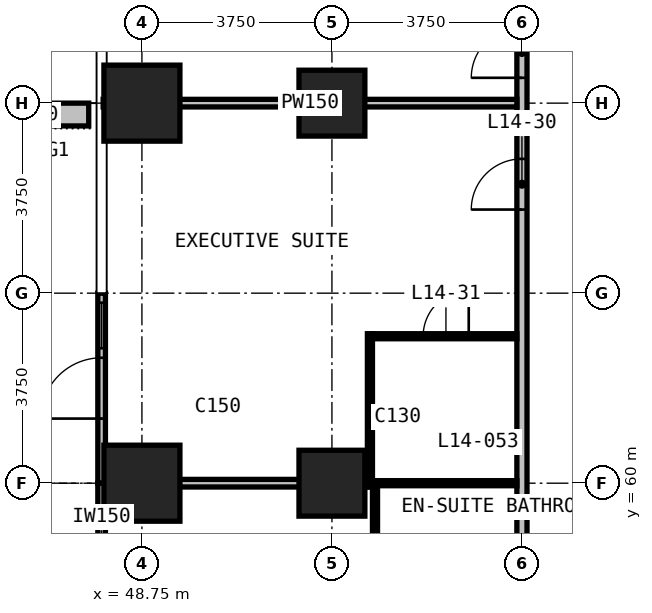
"""IFC4 building model, lengths in metres.
Left out: names, types, materials, properties, quantities, classifications, styles, units other than length and angle.
Written with IfcOpenShell. Run it as: python <this file> out.ifc"""

import sys

from ifc_helpers import new_model, si_unit, direction, frame, frame_2d, origin, origin_2d, place, context, subcontext, project, spatial, rectangle, extrude, element, fill, save


model = new_model("IFC4")
c1 = context("Model", 3, precision=1e-05, world=origin(), true_north=direction((0.0, 1.0)))
c2 = subcontext(c1, "Body", "Model", "MODEL_VIEW")
j1 = project(units=[si_unit("LENGTHUNIT", "METRE"), si_unit("PLANEANGLEUNIT", "RADIAN")], contexts=[c1])
p1 = place(None, origin())
s1 = spatial("IfcSite", under=j1, at=p1, CompositionType="ELEMENT")
p2 = place(p1, origin())
s2 = spatial("IfcBuilding", under=s1, at=p2, CompositionType="ELEMENT")
p3 = place(p2, frame((0.0, 0.0, 65.9)))
s3 = spatial("IfcBuildingStorey", under=s2, at=p3, CompositionType="ELEMENT", Elevation=65.9)
for number, where, z_axis, x_axis in (
    (1, (48.75, 60.0, 0.0), (0.0, 0.0, 1.0), (1.0, 0.0, 0.0)),
    (2, (48.75, 67.5, 0.0), (0.0, 0.0, 1.0), (1.0, 0.0, 0.0)),
):
    element("IfcColumn", number, at=place(p3, frame(where, z_axis=z_axis, x_axis=x_axis)), inside=s3, PredefinedType="COLUMN", context=c2, shape_type="SweptSolid", body=[
        extrude(rectangle(XDim=1.5, YDim=1.5, at=origin_2d()), origin(), (0.0, 0.0, 1.0), 3.3),
    ])
for number, where, z_axis, x_axis in (
    (3, (52.5, 60.0, 0.0), (0.0, 0.0, 1.0), (1.0, 0.0, 0.0)),
    (4, (52.5, 67.5, 0.0), (0.0, 0.0, 1.0), (1.0, 0.0, 0.0)),
):
    element("IfcColumn", number, at=place(p3, frame(where, z_axis=z_axis, x_axis=x_axis)), inside=s3, PredefinedType="COLUMN", context=c2, shape_type="SweptSolid", body=[
        extrude(rectangle(XDim=1.3, YDim=1.3, at=origin_2d()), origin(), (0.0, 0.0, 1.0), 3.3),
    ])
p4 = place(p3, frame((47.955, 56.25, 0.0), z_axis=(0.0, 0.0, 1.0), x_axis=(0.0, 1.0, 0.0)))
e5 = element("IfcWall", 5, at=p4, inside=s3, PredefinedType="SOLIDWALL", context=c2, shape_type="SweptSolid", body=[
    extrude(rectangle(XDim=3.75, YDim=0.15, at=frame_2d((1.875, 0.0))), origin(), (0.0, 0.0, 1.0), 3.0),
])
p5 = place(p4, frame((0.188, 0.0, 0.1)))
e6 = element("IfcOpeningElement", 6, at=p5, cuts=e5, PredefinedType="OPENING", context=c2, shape_type="SweptSolid", body=[
    extrude(rectangle(XDim=0.9, YDim=2.4, at=frame_2d((0.45, 1.2))), frame((0.0, 0.085, 0.0), z_axis=(0.0, -1.0, 0.0), x_axis=(1.0, 0.0, 0.0)), (0.0, 0.0, 1.0), 0.17),
])
p6 = place(p4, frame((1.275, 0.0, 0.0)))
e7 = element("IfcOpeningElement", 7, at=p6, cuts=e5, PredefinedType="OPENING", context=c2, shape_type="SweptSolid", body=[
    extrude(rectangle(XDim=1.2, YDim=2.4, at=frame_2d((0.6, 1.2))), frame((0.0, 0.085, 0.0), z_axis=(0.0, -1.0, 0.0), x_axis=(1.0, 0.0, 0.0)), (0.0, 0.0, 1.0), 0.17),
])
p7 = place(p3, frame((47.955, 60.0, 0.0), z_axis=(0.0, 0.0, 1.0), x_axis=(0.0, 1.0, 0.0)))
e8 = element("IfcWall", 8, at=p7, inside=s3, PredefinedType="SOLIDWALL", context=c2, shape_type="SweptSolid", body=[
    extrude(rectangle(XDim=3.75, YDim=0.15, at=frame_2d((1.875, 0.0))), origin(), (0.0, 0.0, 1.0), 3.0),
])
p8 = place(p7, frame((1.275, 0.0, 0.0)))
e9 = element("IfcOpeningElement", 9, at=p8, cuts=e8, PredefinedType="OPENING", context=c2, shape_type="SweptSolid", body=[
    extrude(rectangle(XDim=1.2, YDim=2.4, at=frame_2d((0.6, 1.2))), frame((0.0, 0.085, 0.0), z_axis=(0.0, -1.0, 0.0), x_axis=(1.0, 0.0, 0.0)), (0.0, 0.0, 1.0), 0.17),
])
p9 = place(p7, frame((2.663, 0.0, 0.1)))
e10 = element("IfcOpeningElement", 10, at=p9, cuts=e8, PredefinedType="OPENING", context=c2, shape_type="SweptSolid", body=[
    extrude(rectangle(XDim=0.9, YDim=2.4, at=frame_2d((0.45, 1.2))), frame((0.0, 0.085, 0.0), z_axis=(0.0, -1.0, 0.0), x_axis=(1.0, 0.0, 0.0)), (0.0, 0.0, 1.0), 0.17),
])
p10 = place(p3, frame((47.7, 67.275, 0.0), z_axis=(0.0, 0.0, 1.0), x_axis=(-1.0, 0.0, 0.0)))
e11 = element("IfcWall", 11, at=p10, inside=s3, PredefinedType="USERDEFINED", context=c2, shape_type="SweptSolid", body=[
    extrude(rectangle(XDim=2.35, YDim=0.45, at=frame_2d((1.175, 0.0))), origin(), (0.0, 0.0, 1.0), 1.1),
])
p11 = place(p3, frame((56.25, 52.4, 0.0), z_axis=(0.0, 0.0, 1.0), x_axis=(0.0, 1.0, 0.0)))
e12 = element("IfcWall", 12, at=p11, inside=s3, PredefinedType="PARTITIONING", context=c2, shape_type="SweptSolid", body=[
    extrude(rectangle(XDim=38.31, YDim=0.2, at=frame_2d((19.155, 0.0))), origin(), (0.0, 0.0, 1.0), 3.0),
])
p12 = place(p11, frame((2.35, 0.0, 0.0)))
e13 = element("IfcOpeningElement", 13, at=p12, cuts=e12, PredefinedType="OPENING", context=c2, shape_type="SweptSolid", body=[
    extrude(rectangle(XDim=1.0, YDim=2.2, at=frame_2d((0.5, 1.1))), frame((0.0, 0.11, 0.0), z_axis=(0.0, -1.0, 0.0), x_axis=(1.0, 0.0, 0.0)), (0.0, 0.0, 1.0), 0.22),
])
p13 = place(p11, frame((4.35, 0.0, 0.0)))
e14 = element("IfcOpeningElement", 14, at=p13, cuts=e12, PredefinedType="OPENING", context=c2, shape_type="SweptSolid", body=[
    extrude(rectangle(XDim=1.0, YDim=2.2, at=frame_2d((0.5, 1.1))), frame((0.0, 0.11, 0.0), z_axis=(0.0, -1.0, 0.0), x_axis=(1.0, 0.0, 0.0)), (0.0, 0.0, 1.0), 0.22),
])
p14 = place(p11, frame((13.0, 0.0, 0.0)))
e15 = element("IfcOpeningElement", 15, at=p14, cuts=e12, PredefinedType="OPENING", context=c2, shape_type="SweptSolid", body=[
    extrude(rectangle(XDim=1.0, YDim=2.2, at=frame_2d((0.5, 1.1))), frame((0.0, 0.11, 0.0), z_axis=(0.0, -1.0, 0.0), x_axis=(1.0, 0.0, 0.0)), (0.0, 0.0, 1.0), 0.22),
])
p15 = place(p11, frame((15.6, 0.0, 0.0)))
e16 = element("IfcOpeningElement", 16, at=p15, cuts=e12, PredefinedType="OPENING", context=c2, shape_type="SweptSolid", body=[
    extrude(rectangle(XDim=1.0, YDim=2.2, at=frame_2d((0.5, 1.1))), frame((0.0, 0.11, 0.0), z_axis=(0.0, -1.0, 0.0), x_axis=(1.0, 0.0, 0.0)), (0.0, 0.0, 1.0), 0.22),
])
p16 = place(p11, frame((21.1, 0.0, 0.0)))
e17 = element("IfcOpeningElement", 17, at=p16, cuts=e12, PredefinedType="OPENING", context=c2, shape_type="SweptSolid", body=[
    extrude(rectangle(XDim=1.0, YDim=2.2, at=frame_2d((0.5, 1.1))), frame((0.0, 0.11, 0.0), z_axis=(0.0, -1.0, 0.0), x_axis=(1.0, 0.0, 0.0)), (0.0, 0.0, 1.0), 0.22),
])
p17 = place(p11, frame((23.7, 0.0, 0.0)))
e18 = element("IfcOpeningElement", 18, at=p17, cuts=e12, PredefinedType="OPENING", context=c2, shape_type="SweptSolid", body=[
    extrude(rectangle(XDim=1.0, YDim=2.2, at=frame_2d((0.5, 1.1))), frame((0.0, 0.11, 0.0), z_axis=(0.0, -1.0, 0.0), x_axis=(1.0, 0.0, 0.0)), (0.0, 0.0, 1.0), 0.22),
])
p18 = place(p11, frame((31.55, 0.0, 0.0)))
e19 = element("IfcOpeningElement", 19, at=p18, cuts=e12, PredefinedType="OPENING", context=c2, shape_type="SweptSolid", body=[
    extrude(rectangle(XDim=0.9, YDim=2.2, at=frame_2d((0.45, 1.1))), frame((0.0, 0.11, 0.0), z_axis=(0.0, -1.0, 0.0), x_axis=(1.0, 0.0, 0.0)), (0.0, 0.0, 1.0), 0.22),
])
p19 = place(p11, frame((35.65, 0.0, 0.0)))
e20 = element("IfcOpeningElement", 20, at=p19, cuts=e12, PredefinedType="OPENING", context=c2, shape_type="SweptSolid", body=[
    extrude(rectangle(XDim=0.9, YDim=2.2, at=frame_2d((0.45, 1.1))), frame((0.0, 0.11, 0.0), z_axis=(0.0, -1.0, 0.0), x_axis=(1.0, 0.0, 0.0)), (0.0, 0.0, 1.0), 0.22),
])
p20 = place(p3, frame((48.04, 60.0, 0.0), z_axis=(0.0, 0.0, 1.0), x_axis=(1.0, 0.0, 0.0)))
e21 = element("IfcWall", 21, at=p20, inside=s3, PredefinedType="PARTITIONING", context=c2, shape_type="SweptSolid", body=[
    extrude(rectangle(XDim=5.16, YDim=0.15, at=frame_2d((2.58, 0.0))), origin(), (0.0, 0.0, 1.0), 3.0),
])
p21 = place(p3, frame((47.985, 67.5, 0.0), z_axis=(0.0, 0.0, 1.0), x_axis=(1.0, 0.0, 0.0)))
e22 = element("IfcWall", 22, at=p21, inside=s3, PredefinedType="PARTITIONING", context=c2, shape_type="SweptSolid", body=[
    extrude(rectangle(XDim=8.165, YDim=0.15, at=frame_2d((4.083, 0.0))), origin(), (0.0, 0.0, 1.0), 3.0),
])
p22 = place(p3, frame((53.4, 60.0, 0.0), z_axis=(0.0, 0.0, 1.0), x_axis=(1.0, 0.0, 0.0)))
e23 = element("IfcWall", 23, at=p22, inside=s3, PredefinedType="PARTITIONING", context=c2, shape_type="SweptSolid", body=[
    extrude(rectangle(XDim=2.75, YDim=0.1, at=frame_2d((1.375, 0.0))), origin(), (0.0, 0.0, 1.0), 3.0),
])
p23 = place(p3, frame((53.3, 62.9, 0.0), z_axis=(0.0, 0.0, 1.0), x_axis=(1.0, 0.0, 0.0)))
e24 = element("IfcWall", 24, at=p23, inside=s3, PredefinedType="PARTITIONING", context=c2, shape_type="SweptSolid", body=[
    extrude(rectangle(XDim=2.85, YDim=0.1, at=frame_2d((1.425, 0.0))), origin(), (0.0, 0.0, 1.0), 3.0),
])
p24 = place(p23, frame((1.0, 0.0, 0.0)))
e25 = element("IfcOpeningElement", 25, at=p24, cuts=e24, PredefinedType="OPENING", context=c2, shape_type="SweptSolid", body=[
    extrude(rectangle(XDim=0.9, YDim=2.2, at=frame_2d((0.45, 1.1))), frame((0.0, 0.06, 0.0), z_axis=(0.0, -1.0, 0.0), x_axis=(1.0, 0.0, 0.0)), (0.0, 0.0, 1.0), 0.12),
])
p25 = place(p3, frame((53.25, 59.925, 0.0), z_axis=(0.0, 0.0, 1.0), x_axis=(0.0, 1.0, 0.0)))
e26 = element("IfcWall", 26, at=p25, inside=s3, PredefinedType="PARTITIONING", context=c2, shape_type="SweptSolid", body=[
    extrude(rectangle(XDim=3.025, YDim=0.1, at=frame_2d((1.512, 0.0))), origin(), (0.0, 0.0, 1.0), 3.0),
])
p26 = place(p3, frame((53.35, 58.05, 0.0), z_axis=(0.0, 0.0, 1.0), x_axis=(0.0, 1.0, 0.0)))
e27 = element("IfcWall", 27, at=p26, inside=s3, PredefinedType="PARTITIONING", context=c2, shape_type="SweptSolid", body=[
    extrude(rectangle(XDim=2.0, YDim=0.1, at=frame_2d((1.0, 0.0))), origin(), (0.0, 0.0, 1.0), 3.0),
])
p27 = place(p8, origin())
e28 = element("IfcDoor", 28, at=p27, inside=s3, OperationType="SINGLE_SWING_LEFT", PredefinedType="DOOR", context=c2, shape_type="SweptSolid", body=[
    extrude(rectangle(XDim=1.2, YDim=2.4, at=frame_2d((0.6, 1.2))), frame((0.0, 0.025, 0.0), z_axis=(0.0, -1.0, 0.0), x_axis=(1.0, 0.0, 0.0)), (0.0, 0.0, 1.0), 0.05),
])
fill(e9, e28)
p28 = place(p9, origin())
e29 = element("IfcWindow", 29, at=p28, inside=s3, PartitioningType="SINGLE_PANEL", PredefinedType="WINDOW", context=c2, shape_type="SweptSolid", body=[
    extrude(rectangle(XDim=0.9, YDim=2.4, at=frame_2d((0.45, 1.2))), frame((0.0, 0.03, 0.0), z_axis=(0.0, -1.0, 0.0), x_axis=(1.0, 0.0, 0.0)), (0.0, 0.0, 1.0), 0.06),
])
fill(e10, e29)
p29 = place(p14, origin())
e30 = element("IfcDoor", 30, at=p29, inside=s3, OperationType="SINGLE_SWING_RIGHT", PredefinedType="DOOR", context=c2, shape_type="SweptSolid", body=[
    extrude(rectangle(XDim=1.0, YDim=2.2, at=frame_2d((0.5, 1.1))), frame((0.0, 0.025, 0.0), z_axis=(0.0, -1.0, 0.0), x_axis=(1.0, 0.0, 0.0)), (0.0, 0.0, 1.0), 0.05),
])
fill(e15, e30)
p30 = place(p24, origin())
e31 = element("IfcDoor", 31, at=p30, inside=s3, OperationType="SINGLE_SWING_RIGHT", PredefinedType="DOOR", context=c2, shape_type="SweptSolid", body=[
    extrude(rectangle(XDim=0.9, YDim=2.2, at=frame_2d((0.45, 1.1))), frame((0.0, 0.025, 0.0), z_axis=(0.0, -1.0, 0.0), x_axis=(1.0, 0.0, 0.0)), (0.0, 0.0, 1.0), 0.05),
])
fill(e25, e31)
p31 = place(p15, origin())
e32 = element("IfcDoor", 32, at=p31, inside=s3, OperationType="SINGLE_SWING_LEFT", PredefinedType="DOOR", context=c2, shape_type="SweptSolid", body=[
    extrude(rectangle(XDim=1.0, YDim=2.2, at=frame_2d((0.5, 1.1))), frame((0.0, 0.025, 0.0), z_axis=(0.0, -1.0, 0.0), x_axis=(1.0, 0.0, 0.0)), (0.0, 0.0, 1.0), 0.05),
])
fill(e16, e32)
save(model, sys.argv[1])
